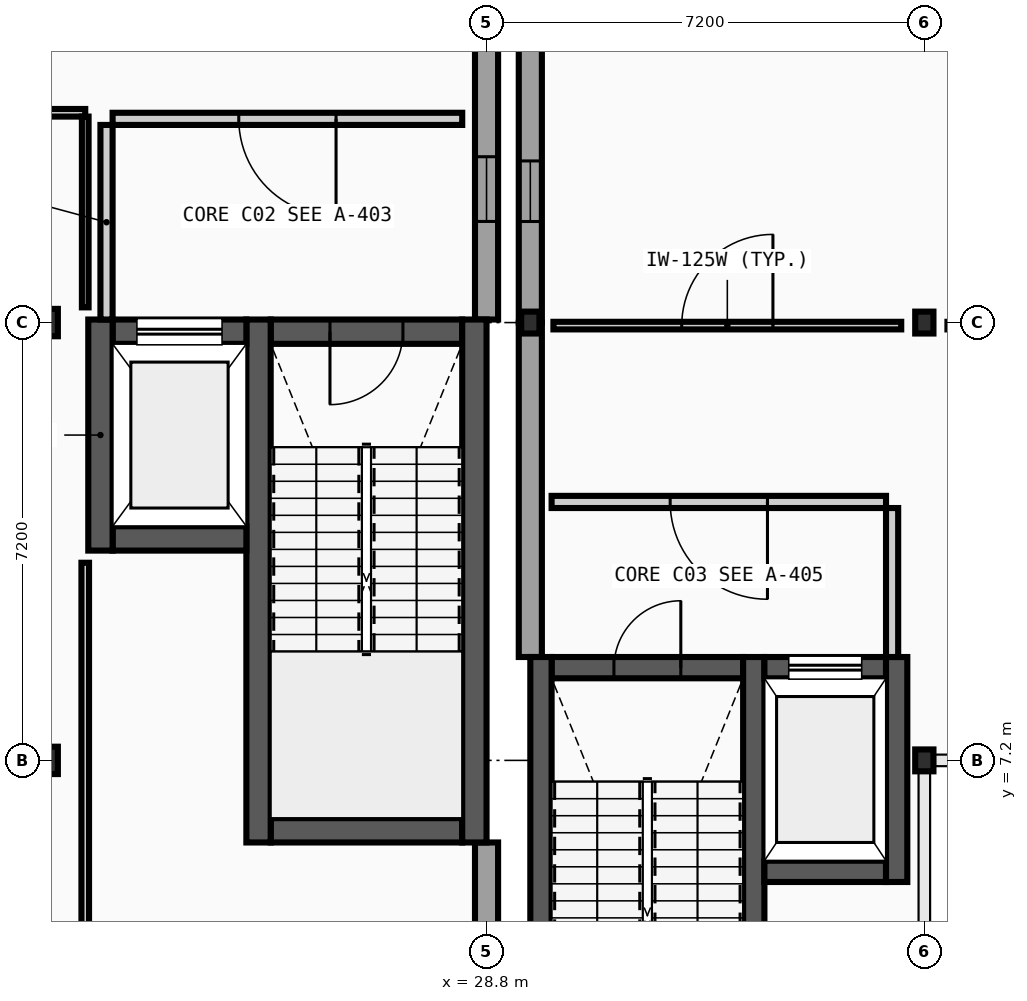
"""IFC4 building model, lengths in metres.
Left out: names, types, materials, properties, quantities, classifications, styles, units other than length and angle.
Written with IfcOpenShell. Run it as: python <this file> out.ifc"""

import sys

from ifc_helpers import new_model, si_unit, direction, frame, frame_2d, origin, origin_2d, place, context, subcontext, project, spatial, rectangle, i_section, extrude, element, fill, save


model = new_model("IFC4")
c1 = context("Model", 3, precision=1e-05, world=origin(), true_north=direction((0.0, 1.0)))
c2 = subcontext(c1, "Body", "Model", "MODEL_VIEW")
j1 = project(units=[si_unit("LENGTHUNIT", "METRE"), si_unit("PLANEANGLEUNIT", "RADIAN")], contexts=[c1])
p1 = place(None, origin())
s1 = spatial("IfcSite", under=j1, at=p1, CompositionType="ELEMENT")
p2 = place(p1, origin())
s2 = spatial("IfcBuilding", under=s1, at=p2, CompositionType="ELEMENT")
p3 = place(p2, frame((0.0, 0.0, 9.6)))
s3 = spatial("IfcBuildingStorey", under=s2, at=p3, CompositionType="ELEMENT", Elevation=9.6)
for number, where, z_axis, x_axis in (
    (1, (21.6, 7.2, 0.0), (0.0, 0.0, 1.0), (1.0, 0.0, 0.0)),
    (2, (21.6, 14.4, 0.0), (0.0, 0.0, 1.0), (1.0, 0.0, 0.0)),
):
    element("IfcColumn", number, at=place(p3, frame(where, z_axis=z_axis, x_axis=x_axis)), inside=s3, PredefinedType="COLUMN", context=c2, shape_type="SweptSolid", body=[
        extrude(i_section(OverallWidth=0.3, OverallDepth=0.45, WebThickness=0.014, FlangeThickness=0.026, FilletRadius=0.027, at=origin_2d()), origin(), (0.0, 0.0, 1.0), 4.4),
    ])
for number, where, z_axis, x_axis in (
    (3, (29.52, 14.4, 0.0), (0.0, 0.0, 1.0), (1.0, 0.0, 0.0)),
    (4, (36.0, 7.2, 0.0), (0.0, 0.0, 1.0), (1.0, 0.0, 0.0)),
    (5, (36.0, 14.4, 0.0), (0.0, 0.0, 1.0), (1.0, 0.0, 0.0)),
):
    element("IfcColumn", number, at=place(p3, frame(where, z_axis=z_axis, x_axis=x_axis)), inside=s3, PredefinedType="COLUMN", context=c2, shape_type="SweptSolid", body=[
        extrude(i_section(OverallWidth=0.3, OverallDepth=0.36, WebThickness=0.012, FlangeThickness=0.022, FilletRadius=0.027, at=origin_2d()), origin(), (0.0, 0.0, 1.0), 4.4),
    ])
p4 = place(p3, frame((28.8, -0.19, 0.0), z_axis=(0.0, 0.0, 1.0), x_axis=(0.0, 1.0, 0.0)))
e6 = element("IfcWall", 6, at=p4, inside=s3, PredefinedType="STANDARD", context=c2, shape_type="SweptSolid", body=[
    extrude(rectangle(XDim=6.04, YDim=0.38, at=frame_2d((3.02, 0.0))), origin(), (0.0, 0.0, 1.0), 4.2),
])
p5 = place(p4, frame((2.505, 0.0, 0.95)))
e7 = element("IfcOpeningElement", 7, at=p5, cuts=e6, PredefinedType="OPENING", context=c2, shape_type="SweptSolid", body=[
    extrude(rectangle(XDim=1.03, YDim=1.332, at=frame_2d((0.515, 0.666))), frame((0.0, 0.2, 0.0), z_axis=(0.0, -1.0, 0.0), x_axis=(1.0, 0.0, 0.0)), (0.0, 0.0, 1.0), 0.4),
])
p6 = place(p3, frame((28.8, 14.45, 0.0), z_axis=(0.0, 0.0, 1.0), x_axis=(0.0, 1.0, 0.0)))
e8 = element("IfcWall", 8, at=p6, inside=s3, PredefinedType="STANDARD", context=c2, shape_type="SweptSolid", body=[
    extrude(rectangle(XDim=7.15, YDim=0.38, at=frame_2d((3.575, 0.0))), origin(), (0.0, 0.0, 1.0), 4.2),
])
p7 = place(p6, frame((1.613, 0.0, 0.95)))
e9 = element("IfcOpeningElement", 9, at=p7, cuts=e8, PredefinedType="OPENING", context=c2, shape_type="SweptSolid", body=[
    extrude(rectangle(XDim=1.064, YDim=1.332, at=frame_2d((0.532, 0.666))), frame((0.0, 0.2, 0.0), z_axis=(0.0, -1.0, 0.0), x_axis=(1.0, 0.0, 0.0)), (0.0, 0.0, 1.0), 0.4),
])
p8 = place(p6, frame((4.473, 0.0, 0.95)))
e10 = element("IfcOpeningElement", 10, at=p8, cuts=e8, PredefinedType="OPENING", context=c2, shape_type="SweptSolid", body=[
    extrude(rectangle(XDim=1.064, YDim=1.332, at=frame_2d((0.532, 0.666))), frame((0.0, 0.2, 0.0), z_axis=(0.0, -1.0, 0.0), x_axis=(1.0, 0.0, 0.0)), (0.0, 0.0, 1.0), 0.4),
])
p9 = place(p3, frame((29.52, 14.4, 0.0), z_axis=(0.0, 0.0, 1.0), x_axis=(0.0, -1.0, 0.0)))
e11 = element("IfcWall", 11, at=p9, inside=s3, PredefinedType="STANDARD", context=c2, shape_type="SweptSolid", body=[
    extrude(rectangle(XDim=5.5, YDim=0.38, at=frame_2d((2.75, 0.0))), origin(), (0.0, 0.0, 1.0), 4.2),
])
p10 = place(p3, frame((29.52, 21.6, 0.0), z_axis=(0.0, 0.0, 1.0), x_axis=(0.0, -1.0, 0.0)))
e12 = element("IfcWall", 12, at=p10, inside=s3, PredefinedType="STANDARD", context=c2, shape_type="SweptSolid", body=[
    extrude(rectangle(XDim=7.2, YDim=0.38, at=frame_2d((3.6, 0.0))), origin(), (0.0, 0.0, 1.0), 3.895),
])
p11 = place(p10, frame((1.662, 0.0, 0.95)))
e13 = element("IfcOpeningElement", 13, at=p11, cuts=e12, PredefinedType="OPENING", context=c2, shape_type="SweptSolid", body=[
    extrude(rectangle(XDim=0.996, YDim=1.368, at=frame_2d((0.498, 0.684))), frame((0.0, 0.2, 0.0), z_axis=(0.0, -1.0, 0.0), x_axis=(1.0, 0.0, 0.0)), (0.0, 0.0, 1.0), 0.4),
])
p12 = place(p10, frame((4.542, 0.0, 0.95)))
e14 = element("IfcOpeningElement", 14, at=p12, cuts=e12, PredefinedType="OPENING", context=c2, shape_type="SweptSolid", body=[
    extrude(rectangle(XDim=0.996, YDim=1.368, at=frame_2d((0.498, 0.684))), frame((0.0, 0.2, 0.0), z_axis=(0.0, -1.0, 0.0), x_axis=(1.0, 0.0, 0.0)), (0.0, 0.0, 1.0), 0.4),
])
p13 = place(p3, frame((25.25, 6.05, 0.0), z_axis=(0.0, 0.0, 1.0), x_axis=(1.0, 0.0, 0.0)))
e15 = element("IfcWall", 15, at=p13, inside=s3, PredefinedType="SHEAR", context=c2, shape_type="SweptSolid", body=[
    extrude(rectangle(XDim=3.15, YDim=0.4, at=frame_2d((1.575, 0.0))), origin(), (0.0, 0.0, 1.0), 4.2),
])
p14 = place(p3, frame((25.25, 14.25, 0.0), z_axis=(0.0, 0.0, 1.0), x_axis=(1.0, 0.0, 0.0)))
e16 = element("IfcWall", 16, at=p14, inside=s3, PredefinedType="SHEAR", context=c2, shape_type="SweptSolid", body=[
    extrude(rectangle(XDim=3.15, YDim=0.4, at=frame_2d((1.575, 0.0))), origin(), (0.0, 0.0, 1.0), 4.2),
])
p15 = place(p14, frame((0.975, 0.0, 0.0)))
e17 = element("IfcOpeningElement", 17, at=p15, cuts=e16, PredefinedType="OPENING", context=c2, shape_type="SweptSolid", body=[
    extrude(rectangle(XDim=1.2, YDim=2.15, at=frame_2d((0.6, 1.075))), frame((0.0, 0.21, 0.0), z_axis=(0.0, -1.0, 0.0), x_axis=(1.0, 0.0, 0.0)), (0.0, 0.0, 1.0), 0.42),
])
for number, where, z_axis, x_axis in (
    (18, (25.05, 5.85, 0.0), (0.0, 0.0, 1.0), (0.0, 1.0, 0.0)),
    (19, (28.6, 5.85, 0.0), (0.0, 0.0, 1.0), (0.0, 1.0, 0.0)),
):
    element("IfcWall", number, at=place(p3, frame(where, z_axis=z_axis, x_axis=x_axis)), inside=s3, PredefinedType="SHEAR", context=c2, shape_type="SweptSolid", body=[
        extrude(rectangle(XDim=8.6, YDim=0.4, at=frame_2d((4.3, 0.0))), origin(), (0.0, 0.0, 1.0), 4.2),
    ])
p16 = place(p3, frame((22.65, 10.85, 0.0), z_axis=(0.0, 0.0, 1.0), x_axis=(1.0, 0.0, 0.0)))
e20 = element("IfcWall", 20, at=p16, inside=s3, PredefinedType="SHEAR", context=c2, shape_type="SweptSolid", body=[
    extrude(rectangle(XDim=2.2, YDim=0.4, at=frame_2d((1.1, 0.0))), origin(), (0.0, 0.0, 1.0), 4.2),
])
p17 = place(p3, frame((22.65, 14.25, 0.0), z_axis=(0.0, 0.0, 1.0), x_axis=(1.0, 0.0, 0.0)))
e21 = element("IfcWall", 21, at=p17, inside=s3, PredefinedType="SHEAR", context=c2, shape_type="SweptSolid", body=[
    extrude(rectangle(XDim=2.2, YDim=0.4, at=frame_2d((1.1, 0.0))), origin(), (0.0, 0.0, 1.0), 4.2),
])
p18 = place(p17, frame((0.4, 0.0, 0.0)))
e22 = element("IfcOpeningElement", 22, at=p18, cuts=e21, PredefinedType="OPENING", context=c2, shape_type="SweptSolid", body=[
    extrude(rectangle(XDim=1.4, YDim=2.2, at=frame_2d((0.7, 1.1))), frame((0.0, 0.21, 0.0), z_axis=(0.0, -1.0, 0.0), x_axis=(1.0, 0.0, 0.0)), (0.0, 0.0, 1.0), 0.42),
])
p19 = place(p3, frame((22.45, 10.65, 0.0), z_axis=(0.0, 0.0, 1.0), x_axis=(0.0, 1.0, 0.0)))
e23 = element("IfcWall", 23, at=p19, inside=s3, PredefinedType="SHEAR", context=c2, shape_type="SweptSolid", body=[
    extrude(rectangle(XDim=3.8, YDim=0.4, at=frame_2d((1.9, 0.0))), origin(), (0.0, 0.0, 1.0), 4.2),
])
p20 = place(p3, frame((22.65, 17.75, 0.0), z_axis=(0.0, 0.0, 1.0), x_axis=(1.0, 0.0, 0.0)))
e24 = element("IfcWall", 24, at=p20, inside=s3, PredefinedType="PARTITIONING", context=c2, shape_type="SweptSolid", body=[
    extrude(rectangle(XDim=5.75, YDim=0.2, at=frame_2d((2.875, 0.0))), origin(), (0.0, 0.0, 1.0), 4.2),
])
p21 = place(p20, frame((2.075, 0.0, 0.0)))
e25 = element("IfcOpeningElement", 25, at=p21, cuts=e24, PredefinedType="OPENING", context=c2, shape_type="SweptSolid", body=[
    extrude(rectangle(XDim=1.6, YDim=2.2, at=frame_2d((0.8, 1.1))), frame((0.0, 0.11, 0.0), z_axis=(0.0, -1.0, 0.0), x_axis=(1.0, 0.0, 0.0)), (0.0, 0.0, 1.0), 0.22),
])
p22 = place(p3, frame((22.55, 14.45, 0.0), z_axis=(0.0, 0.0, 1.0), x_axis=(0.0, 1.0, 0.0)))
e26 = element("IfcWall", 26, at=p22, inside=s3, PredefinedType="PARTITIONING", context=c2, shape_type="SweptSolid", body=[
    extrude(rectangle(XDim=3.2, YDim=0.2, at=frame_2d((1.6, 0.0))), origin(), (0.0, 0.0, 1.0), 4.2),
])
p23 = place(p3, frame((29.87, 8.725, 0.0), z_axis=(0.0, 0.0, 1.0), x_axis=(1.0, 0.0, 0.0)))
e27 = element("IfcWall", 27, at=p23, inside=s3, PredefinedType="SHEAR", context=c2, shape_type="SweptSolid", body=[
    extrude(rectangle(XDim=3.15, YDim=0.35, at=frame_2d((1.575, 0.0))), origin(), (0.0, 0.0, 1.0), 4.2),
])
p24 = place(p23, frame((1.025, 0.0, 0.0)))
e28 = element("IfcOpeningElement", 28, at=p24, cuts=e27, PredefinedType="OPENING", context=c2, shape_type="SweptSolid", body=[
    extrude(rectangle(XDim=1.1, YDim=2.15, at=frame_2d((0.55, 1.075))), frame((0.0, 0.185, 0.0), z_axis=(0.0, -1.0, 0.0), x_axis=(1.0, 0.0, 0.0)), (0.0, 0.0, 1.0), 0.37),
])
for number, where, z_axis, x_axis in (
    (29, (29.695, 0.4, 0.0), (0.0, 0.0, 1.0), (0.0, 1.0, 0.0)),
    (30, (33.195, 0.4, 0.0), (0.0, 0.0, 1.0), (0.0, 1.0, 0.0)),
):
    element("IfcWall", number, at=place(p3, frame(where, z_axis=z_axis, x_axis=x_axis)), inside=s3, PredefinedType="SHEAR", context=c2, shape_type="SweptSolid", body=[
        extrude(rectangle(XDim=8.5, YDim=0.35, at=frame_2d((4.25, 0.0))), origin(), (0.0, 0.0, 1.0), 4.2),
    ])
p25 = place(p3, frame((33.37, 5.375, 0.0), z_axis=(0.0, 0.0, 1.0), x_axis=(1.0, 0.0, 0.0)))
e31 = element("IfcWall", 31, at=p25, inside=s3, PredefinedType="SHEAR", context=c2, shape_type="SweptSolid", body=[
    extrude(rectangle(XDim=2.0, YDim=0.35, at=frame_2d((1.0, 0.0))), origin(), (0.0, 0.0, 1.0), 4.2),
])
p26 = place(p3, frame((33.37, 8.725, 0.0), z_axis=(0.0, 0.0, 1.0), x_axis=(1.0, 0.0, 0.0)))
e32 = element("IfcWall", 32, at=p26, inside=s3, PredefinedType="SHEAR", context=c2, shape_type="SweptSolid", body=[
    extrude(rectangle(XDim=2.0, YDim=0.35, at=frame_2d((1.0, 0.0))), origin(), (0.0, 0.0, 1.0), 4.2),
])
p27 = place(p26, frame((0.4, 0.0, 0.0)))
e33 = element("IfcOpeningElement", 33, at=p27, cuts=e32, PredefinedType="OPENING", context=c2, shape_type="SweptSolid", body=[
    extrude(rectangle(XDim=1.2, YDim=2.2, at=frame_2d((0.6, 1.1))), frame((0.0, 0.185, 0.0), z_axis=(0.0, -1.0, 0.0), x_axis=(1.0, 0.0, 0.0)), (0.0, 0.0, 1.0), 0.37),
])
p28 = place(p3, frame((35.545, 5.2, 0.0), z_axis=(0.0, 0.0, 1.0), x_axis=(0.0, 1.0, 0.0)))
e34 = element("IfcWall", 34, at=p28, inside=s3, PredefinedType="SHEAR", context=c2, shape_type="SweptSolid", body=[
    extrude(rectangle(XDim=3.7, YDim=0.35, at=frame_2d((1.85, 0.0))), origin(), (0.0, 0.0, 1.0), 4.2),
])
p29 = place(p3, frame((29.87, 11.45, 0.0), z_axis=(0.0, 0.0, 1.0), x_axis=(1.0, 0.0, 0.0)))
e35 = element("IfcWall", 35, at=p29, inside=s3, PredefinedType="PARTITIONING", context=c2, shape_type="SweptSolid", body=[
    extrude(rectangle(XDim=5.5, YDim=0.2, at=frame_2d((2.75, 0.0))), origin(), (0.0, 0.0, 1.0), 4.2),
])
p30 = place(p29, frame((1.95, 0.0, 0.0)))
e36 = element("IfcOpeningElement", 36, at=p30, cuts=e35, PredefinedType="OPENING", context=c2, shape_type="SweptSolid", body=[
    extrude(rectangle(XDim=1.6, YDim=2.2, at=frame_2d((0.8, 1.1))), frame((0.0, 0.11, 0.0), z_axis=(0.0, -1.0, 0.0), x_axis=(1.0, 0.0, 0.0)), (0.0, 0.0, 1.0), 0.22),
])
p31 = place(p3, frame((35.47, 8.9, 0.0), z_axis=(0.0, 0.0, 1.0), x_axis=(0.0, 1.0, 0.0)))
e37 = element("IfcWall", 37, at=p31, inside=s3, PredefinedType="PARTITIONING", context=c2, shape_type="SweptSolid", body=[
    extrude(rectangle(XDim=2.45, YDim=0.2, at=frame_2d((1.225, 0.0))), origin(), (0.0, 0.0, 1.0), 4.2),
])
p32 = place(p3, frame((29.9, 14.35, 0.0), z_axis=(0.0, 0.0, 1.0), x_axis=(1.0, 0.0, 0.0)))
e38 = element("IfcWall", 38, at=p32, inside=s3, PredefinedType="PARTITIONING", context=c2, shape_type="SweptSolid", body=[
    extrude(rectangle(XDim=5.72, YDim=0.125, at=frame_2d((2.86, 0.0))), origin(), (0.0, 0.0, 1.0), 3.895),
])
p33 = place(p32, frame((2.11, 0.0, 0.0)))
e39 = element("IfcOpeningElement", 39, at=p33, cuts=e38, PredefinedType="OPENING", context=c2, shape_type="SweptSolid", body=[
    extrude(rectangle(XDim=1.5, YDim=2.2, at=frame_2d((0.75, 1.1))), frame((0.0, 0.073, 0.0), z_axis=(0.0, -1.0, 0.0), x_axis=(1.0, 0.0, 0.0)), (0.0, 0.0, 1.0), 0.145),
])
p34 = place(p3, frame((9.45, 17.85, 0.0), z_axis=(0.0, 0.0, 1.0), x_axis=(1.0, 0.0, 0.0)))
e40 = element("IfcWall", 40, at=p34, inside=s3, PredefinedType="PARTITIONING", context=c2, shape_type="SweptSolid", body=[
    extrude(rectangle(XDim=12.75, YDim=0.125, at=frame_2d((6.375, 0.0))), origin(), (0.0, 0.0, 1.0), 4.2),
])
p35 = place(p34, frame((0.45, 0.0, 0.0)))
e41 = element("IfcOpeningElement", 41, at=p35, cuts=e40, PredefinedType="OPENING", context=c2, shape_type="SweptSolid", body=[
    extrude(rectangle(XDim=1.0, YDim=2.1, at=frame_2d((0.5, 1.05))), frame((0.0, 0.073, 0.0), z_axis=(0.0, -1.0, 0.0), x_axis=(1.0, 0.0, 0.0)), (0.0, 0.0, 1.0), 0.145),
])
p36 = place(p34, frame((8.3, 0.0, 0.0)))
e42 = element("IfcOpeningElement", 42, at=p36, cuts=e40, PredefinedType="OPENING", context=c2, shape_type="SweptSolid", body=[
    extrude(rectangle(XDim=0.9, YDim=2.1, at=frame_2d((0.45, 1.05))), frame((0.0, 0.073, 0.0), z_axis=(0.0, -1.0, 0.0), x_axis=(1.0, 0.0, 0.0)), (0.0, 0.0, 1.0), 0.145),
])
p37 = place(p3, frame((22.2, 0.2, 0.0), z_axis=(0.0, 0.0, 1.0), x_axis=(0.0, 1.0, 0.0)))
e43 = element("IfcWall", 43, at=p37, inside=s3, PredefinedType="PARTITIONING", context=c2, shape_type="SweptSolid", body=[
    extrude(rectangle(XDim=10.25, YDim=0.125, at=frame_2d((5.125, 0.0))), origin(), (0.0, 0.0, 1.0), 4.2),
])
p38 = place(p3, frame((22.2, 14.65, 0.0), z_axis=(0.0, 0.0, 1.0), x_axis=(0.0, 1.0, 0.0)))
e44 = element("IfcWall", 44, at=p38, inside=s3, PredefinedType="PARTITIONING", context=c2, shape_type="SweptSolid", body=[
    extrude(rectangle(XDim=3.138, YDim=0.11, at=frame_2d((1.569, 0.0))), origin(), (0.0, 0.0, 1.0), 4.2),
])
p39 = place(p7, origin())
e45 = element("IfcWindow", 45, at=p39, inside=s3, PartitioningType="SINGLE_PANEL", PredefinedType="WINDOW", context=c2, shape_type="SweptSolid", body=[
    extrude(rectangle(XDim=1.064, YDim=1.332, at=frame_2d((0.532, 0.666))), frame((0.0, 0.03, 0.0), z_axis=(0.0, -1.0, 0.0), x_axis=(1.0, 0.0, 0.0)), (0.0, 0.0, 1.0), 0.06),
])
fill(e9, e45)
p40 = place(p12, origin())
e46 = element("IfcWindow", 46, at=p40, inside=s3, PartitioningType="SINGLE_PANEL", PredefinedType="WINDOW", context=c2, shape_type="SweptSolid", body=[
    extrude(rectangle(XDim=0.996, YDim=1.368, at=frame_2d((0.498, 0.684))), frame((0.0, 0.03, 0.0), z_axis=(0.0, -1.0, 0.0), x_axis=(1.0, 0.0, 0.0)), (0.0, 0.0, 1.0), 0.06),
])
fill(e14, e46)
p41 = place(p15, frame((1.2, 0.0, 0.0), z_axis=(0.0, 0.0, 1.0), x_axis=(-1.0, 0.0, 0.0)))
e47 = element("IfcDoor", 47, at=p41, inside=s3, OperationType="SINGLE_SWING_LEFT", PredefinedType="DOOR", context=c2, shape_type="SweptSolid", body=[
    extrude(rectangle(XDim=1.2, YDim=2.15, at=frame_2d((0.6, 1.075))), frame((0.0, 0.025, 0.0), z_axis=(0.0, -1.0, 0.0), x_axis=(1.0, 0.0, 0.0)), (0.0, 0.0, 1.0), 0.05),
])
fill(e17, e47)
p42 = place(p18, origin())
e48 = element("IfcDoor", 48, at=p42, inside=s3, OperationType="SLIDING_TO_LEFT", PredefinedType="DOOR", context=c2, shape_type="SweptSolid", body=[
    extrude(rectangle(XDim=1.4, YDim=2.2, at=frame_2d((0.7, 1.1))), frame((0.0, 0.025, 0.0), z_axis=(0.0, -1.0, 0.0), x_axis=(1.0, 0.0, 0.0)), (0.0, 0.0, 1.0), 0.05),
])
fill(e22, e48)
p43 = place(p21, origin())
e49 = element("IfcDoor", 49, at=p43, inside=s3, OperationType="DOUBLE_DOOR_SINGLE_SWING", PredefinedType="DOOR", context=c2, shape_type="SweptSolid", body=[
    extrude(rectangle(XDim=1.6, YDim=2.2, at=frame_2d((0.8, 1.1))), frame((0.0, 0.025, 0.0), z_axis=(0.0, -1.0, 0.0), x_axis=(1.0, 0.0, 0.0)), (0.0, 0.0, 1.0), 0.05),
])
fill(e25, e49)
p44 = place(p24, frame((1.1, 0.0, 0.0), z_axis=(0.0, 0.0, 1.0), x_axis=(-1.0, 0.0, 0.0)))
e50 = element("IfcDoor", 50, at=p44, inside=s3, OperationType="SINGLE_SWING_RIGHT", PredefinedType="DOOR", context=c2, shape_type="SweptSolid", body=[
    extrude(rectangle(XDim=1.1, YDim=2.15, at=frame_2d((0.55, 1.075))), frame((0.0, 0.025, 0.0), z_axis=(0.0, -1.0, 0.0), x_axis=(1.0, 0.0, 0.0)), (0.0, 0.0, 1.0), 0.05),
])
fill(e28, e50)
p45 = place(p27, origin())
e51 = element("IfcDoor", 51, at=p45, inside=s3, OperationType="SLIDING_TO_RIGHT", PredefinedType="DOOR", context=c2, shape_type="SweptSolid", body=[
    extrude(rectangle(XDim=1.2, YDim=2.2, at=frame_2d((0.6, 1.1))), frame((0.0, 0.025, 0.0), z_axis=(0.0, -1.0, 0.0), x_axis=(1.0, 0.0, 0.0)), (0.0, 0.0, 1.0), 0.05),
])
fill(e33, e51)
p46 = place(p30, origin())
e52 = element("IfcDoor", 52, at=p46, inside=s3, OperationType="DOUBLE_DOOR_SINGLE_SWING", PredefinedType="DOOR", context=c2, shape_type="SweptSolid", body=[
    extrude(rectangle(XDim=1.6, YDim=2.2, at=frame_2d((0.8, 1.1))), frame((0.0, 0.025, 0.0), z_axis=(0.0, -1.0, 0.0), x_axis=(1.0, 0.0, 0.0)), (0.0, 0.0, 1.0), 0.05),
])
fill(e36, e52)
p47 = place(p33, frame((1.5, 0.0, 0.0), z_axis=(0.0, 0.0, 1.0), x_axis=(-1.0, 0.0, 0.0)))
e53 = element("IfcDoor", 53, at=p47, inside=s3, OperationType="DOUBLE_DOOR_SINGLE_SWING", PredefinedType="DOOR", context=c2, shape_type="SweptSolid", body=[
    extrude(rectangle(XDim=1.5, YDim=2.2, at=frame_2d((0.75, 1.1))), frame((0.0, 0.025, 0.0), z_axis=(0.0, -1.0, 0.0), x_axis=(1.0, 0.0, 0.0)), (0.0, 0.0, 1.0), 0.05),
])
fill(e39, e53)
save(model, sys.argv[1])
